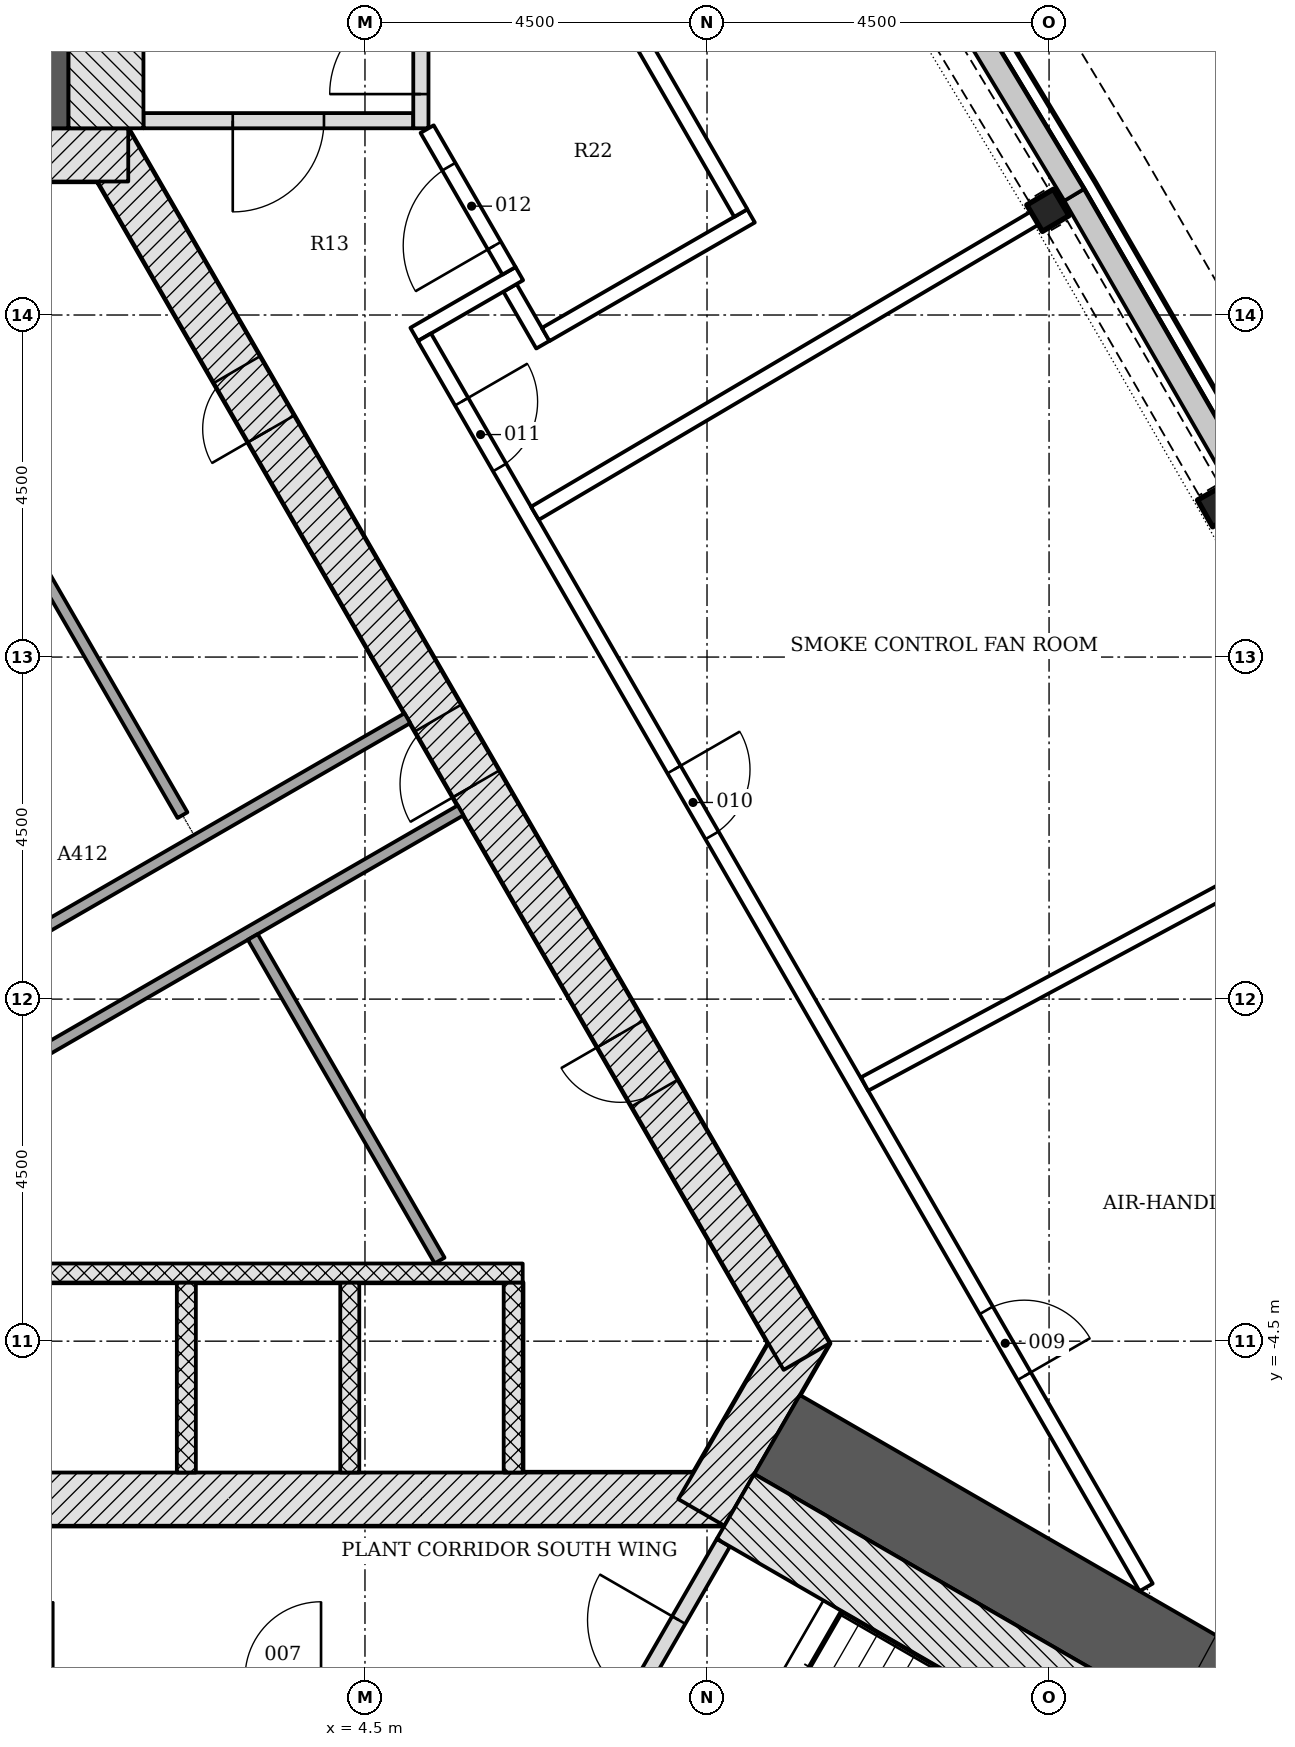
"""IFC4 building model, lengths in metres.
Left out: names, types, materials, properties, quantities, classifications, styles, units other than length and angle.
Written with IfcOpenShell. Run it as: python <this file> out.ifc"""

import sys

from ifc_helpers import new_model, si_unit, direction, frame, frame_2d, origin, origin_2d, place, context, subcontext, project, spatial, polyline, rectangle, i_section, outline, extrude, element, fill, save


model = new_model("IFC4")
c1 = context("Model", 3, precision=1e-05, world=origin(), true_north=direction((0.0, 1.0)))
c2 = subcontext(c1, "Body", "Model", "MODEL_VIEW")
j1 = project(units=[si_unit("LENGTHUNIT", "METRE"), si_unit("PLANEANGLEUNIT", "RADIAN")], contexts=[c1])
p1 = place(None, origin())
s1 = spatial("IfcSite", under=j1, at=p1, CompositionType="ELEMENT")
p2 = place(p1, origin())
s2 = spatial("IfcBuilding", under=s1, at=p2, CompositionType="ELEMENT")
p3 = place(p2, frame((0.0, 0.0, 87.0)))
s3 = spatial("IfcBuildingStorey", under=s2, at=p3, CompositionType="ELEMENT", Elevation=87.0)
p4 = place(p3, frame((-9.229, -6.578, -0.3), z_axis=(0.0, 0.0, 1.0), x_axis=(1.0, 0.0, 0.0)))
e1 = element("IfcWall", 1, at=p4, inside=s3, PredefinedType="SHEAR", context=c2, shape_type="SweptSolid", body=[
    extrude(rectangle(XDim=18.458, YDim=0.7, at=frame_2d((9.229, 0.0))), origin(), (0.0, 0.0, 1.0), 4.6),
])
p5 = place(p4, frame((1.079, 0.0, 0.3)))
e2 = element("IfcOpeningElement", 2, at=p5, cuts=e1, PredefinedType="OPENING", context=c2, shape_type="SweptSolid", body=[
    extrude(rectangle(XDim=0.9, YDim=2.1, at=frame_2d((0.45, 1.05))), frame((0.0, 0.36, 0.0), z_axis=(0.0, -1.0, 0.0), x_axis=(1.0, 0.0, 0.0)), (0.0, 0.0, 1.0), 0.72),
])
p6 = place(p3, frame((8.926, -6.753, -0.3), z_axis=(0.0, 0.0, 1.0), x_axis=(0.500042739161, 0.866000726912, 0.0)))
e3 = element("IfcWall", 3, at=p6, inside=s3, PredefinedType="SHEAR", context=c2, shape_type="SweptSolid", body=[
    extrude(rectangle(XDim=2.771, YDim=0.7, at=frame_2d((1.386, 0.0))), origin(), (0.0, 0.0, 1.0), 4.6),
])
p7 = place(p3, frame((10.311, -4.703, -0.3), z_axis=(0.0, 0.0, 1.0), x_axis=(-0.500001446645, 0.866024568562, 0.0)))
e4 = element("IfcWall", 4, at=p7, inside=s3, PredefinedType="SHEAR", context=c2, shape_type="SweptSolid", body=[
    extrude(rectangle(XDim=18.458, YDim=0.7, at=frame_2d((9.229, 0.0))), origin(), (0.0, 0.0, 1.0), 4.6),
])
p8 = place(p7, frame((8.7, 0.0, 0.3)))
e5 = element("IfcOpeningElement", 5, at=p8, cuts=e4, PredefinedType="OPENING", context=c2, shape_type="SweptSolid", body=[
    extrude(rectangle(XDim=1.0, YDim=2.1, at=frame_2d((0.5, 1.05))), frame((0.0, 0.36, 0.0), z_axis=(0.0, -1.0, 0.0), x_axis=(1.0, 0.0, 0.0)), (0.0, 0.0, 1.0), 0.72),
])
p9 = place(p7, frame((4.002, 0.0, 0.3)))
e6 = element("IfcOpeningElement", 6, at=p9, cuts=e4, PredefinedType="OPENING", context=c2, shape_type="SweptSolid", body=[
    extrude(rectangle(XDim=0.9, YDim=2.1, at=frame_2d((0.45, 1.05))), frame((0.0, 0.36, 0.0), z_axis=(0.0, -1.0, 0.0), x_axis=(1.0, 0.0, 0.0)), (0.0, 0.0, 1.0), 0.72),
])
p10 = place(p7, frame((14.093, 0.0, 0.3)))
e7 = element("IfcOpeningElement", 7, at=p10, cuts=e4, PredefinedType="OPENING", context=c2, shape_type="SweptSolid", body=[
    extrude(rectangle(XDim=0.9, YDim=2.1, at=frame_2d((0.45, 1.05))), frame((0.0, 0.36, 0.0), z_axis=(0.0, -1.0, 0.0), x_axis=(1.0, 0.0, 0.0)), (0.0, 0.0, 1.0), 0.72),
])
p11 = place(p3, frame((1.386, 11.106, -0.3), z_axis=(0.0, 0.0, 1.0), x_axis=(-1.0, 0.0, 0.0)))
e8 = element("IfcWall", 8, at=p11, inside=s3, PredefinedType="SHEAR", context=c2, shape_type="SweptSolid", body=[
    extrude(rectangle(XDim=2.771, YDim=0.7, at=frame_2d((1.386, 0.0))), origin(), (0.0, 0.0, 1.0), 4.6),
])
p12 = place(p3, frame((0.0, 11.456, -0.3), z_axis=(0.0, 0.0, 1.0), x_axis=(0.0, 1.0, 0.0)))
e9 = element("IfcWall", 9, at=p12, inside=s3, PredefinedType="SHEAR", context=c2, shape_type="SweptSolid", body=[
    extrude(rectangle(XDim=12.678, YDim=1.2, at=frame_2d((6.339, 0.0))), origin(), (0.0, 0.0, 1.0), 4.6),
])
p13 = place(p3, frame((9.922, -5.728, -0.3), z_axis=(0.0, 0.0, 1.0), x_axis=(0.866029086277, -0.499993621681, 0.0)))
e10 = element("IfcWall", 10, at=p13, inside=s3, PredefinedType="SHEAR", context=c2, shape_type="SweptSolid", body=[
    extrude(rectangle(XDim=12.677, YDim=1.2, at=frame_2d((6.339, 0.0))), origin(), (0.0, 0.0, 1.0), 4.6),
])
for number, where, z_axis, x_axis in (
    (11, (15.729, 6.49, -0.3), (0.0, 0.0, 1.0), (-0.491, 0.871, 0.0)),
    (12, (13.484, 10.377, -0.3), (0.0, 0.0, 1.0), (-0.508, 0.861, 0.0)),
):
    element("IfcColumn", number, at=place(p3, frame(where, z_axis=z_axis, x_axis=x_axis)), inside=s3, PredefinedType="COLUMN", context=c2, shape_type="SweptSolid", body=[
        extrude(i_section(OverallWidth=0.404, OverallDepth=0.406, WebThickness=0.027, FlangeThickness=0.044, FilletRadius=0.015, at=origin_2d()), origin(), (0.0, 0.0, 1.0), 4.6),
    ])
p14 = place(p3, origin())
e13 = element("IfcWall", 13, at=p14, inside=s3, PredefinedType="NOTDEFINED", context=c2, shape_type="SweptSolid", body=[
    extrude(outline(polyline([(16.208, 6.76), (13.958, 10.657), (13.698, 10.507), (15.948, 6.61), (16.208, 6.76)])), origin(), (0.0, 0.0, 1.0), 1.2),
])
p15 = place(p3, origin())
e14 = element("IfcWall", 14, at=p15, inside=s3, PredefinedType="NOTDEFINED", context=c2, shape_type="SweptSolid", body=[
    extrude(outline(polyline([(13.958, 10.657), (11.632, 14.509), (11.375, 14.354), (13.701, 10.502), (13.958, 10.657)])), origin(), (0.0, 0.0, 1.0), 1.2),
])
for number, where, z_axis, x_axis in (
    (15, (2.15, -6.228, -0.3), (0.0, 0.0, 1.0), (0.0, 1.0, 0.0)),
    (16, (4.3, -6.228, -0.3), (0.0, 0.0, 1.0), (0.0, 1.0, 0.0)),
    (17, (6.45, -6.228, -0.3), (0.0, 0.0, 1.0), (0.0, 1.0, 0.0)),
):
    element("IfcWall", number, at=place(p3, frame(where, z_axis=z_axis, x_axis=x_axis)), inside=s3, PredefinedType="PARTITIONING", context=c2, shape_type="SweptSolid", body=[
        extrude(rectangle(XDim=2.5, YDim=0.25, at=frame_2d((1.25, 0.0))), origin(), (0.0, 0.0, 1.0), 4.6),
    ])
p16 = place(p3, frame((-6.575, -3.603, 0.0), z_axis=(0.0, 0.0, 1.0), x_axis=(1.0, 0.0, 0.0)))
e18 = element("IfcWall", 18, at=p16, inside=s3, PredefinedType="PARTITIONING", context=c2, shape_type="SweptSolid", body=[
    extrude(rectangle(XDim=13.15, YDim=0.25, at=frame_2d((6.575, 0.0))), origin(), (0.0, 0.0, 1.0), 4.3),
])
p17 = place(p3, frame((-4.548, -1.851, 0.0), z_axis=(0.0, 0.0, 1.0), x_axis=(0.866023939251, 0.500002536638, 0.0)))
e19 = element("IfcWall", 19, at=p17, inside=s3, PredefinedType="PARTITIONING", context=c2, shape_type="SweptSolid", body=[
    extrude(rectangle(XDim=11.092, YDim=0.15, at=frame_2d((5.546, 0.0))), origin(), (0.0, 0.0, 1.0), 4.3),
])
p18 = place(p17, frame((3.497, 0.0, 0.0)))
e20 = element("IfcOpeningElement", 20, at=p18, cuts=e19, PredefinedType="OPENING", context=c2, shape_type="SweptSolid", body=[
    extrude(rectangle(XDim=0.9, YDim=2.1, at=frame_2d((0.45, 1.05))), frame((0.0, 0.085, 0.0), z_axis=(0.0, -1.0, 0.0), x_axis=(1.0, 0.0, 0.0)), (0.0, 0.0, 1.0), 0.17),
])
p19 = place(p3, frame((2.099, 2.42, 0.0), z_axis=(0.0, 0.0, 1.0), x_axis=(-0.499998449073, 0.866026299211, 0.0)))
e21 = element("IfcWall", 21, at=p19, inside=s3, PredefinedType="PARTITIONING", context=c2, shape_type="SweptSolid", body=[
    extrude(rectangle(XDim=4.211, YDim=0.15, at=frame_2d((2.106, 0.0))), origin(), (0.0, 0.0, 1.0), 4.3),
])
p20 = place(p3, frame((-4.454, -3.413, 0.0), z_axis=(0.0, 0.0, 1.0), x_axis=(0.86603043987, 0.499991277142, 0.0)))
e22 = element("IfcWall", 22, at=p20, inside=s3, PredefinedType="PARTITIONING", context=c2, shape_type="SweptSolid", body=[
    extrude(rectangle(XDim=11.792, YDim=0.15, at=frame_2d((5.896, 0.0))), origin(), (0.0, 0.0, 1.0), 4.3),
])
p21 = place(p20, frame((3.847, 0.0, 0.0)))
e23 = element("IfcOpeningElement", 23, at=p21, cuts=e22, PredefinedType="OPENING", context=c2, shape_type="SweptSolid", body=[
    extrude(rectangle(XDim=0.9, YDim=2.1, at=frame_2d((0.45, 1.05))), frame((0.0, 0.085, 0.0), z_axis=(0.0, -1.0, 0.0), x_axis=(1.0, 0.0, 0.0)), (0.0, 0.0, 1.0), 0.17),
])
p22 = place(p3, frame((5.482, -3.439, 0.0), z_axis=(0.0, 0.0, 1.0), x_axis=(-0.500006183238, 0.866021833861, 0.0)))
e24 = element("IfcWall", 24, at=p22, inside=s3, PredefinedType="PARTITIONING", context=c2, shape_type="SweptSolid", body=[
    extrude(rectangle(XDim=4.916, YDim=0.15, at=frame_2d((2.458, 0.0))), origin(), (0.0, 0.0, 1.0), 4.3),
])
p23 = place(p3, frame((5.135, 11.556, -0.3), z_axis=(0.0, 0.0, 1.0), x_axis=(-1.0, 0.0, 0.0)))
e25 = element("IfcWall", 25, at=p23, inside=s3, PredefinedType="SHEAR", context=c2, shape_type="SweptSolid", body=[
    extrude(rectangle(XDim=3.55, YDim=0.2, at=frame_2d((1.775, 0.0))), origin(), (0.0, 0.0, 1.0), 4.6),
])
p24 = place(p23, frame((1.175, 0.0, 0.3)))
e26 = element("IfcOpeningElement", 26, at=p24, cuts=e25, PredefinedType="OPENING", context=c2, shape_type="SweptSolid", body=[
    extrude(rectangle(XDim=1.2, YDim=2.1, at=frame_2d((0.6, 1.05))), frame((0.0, 0.11, 0.0), z_axis=(0.0, -1.0, 0.0), x_axis=(1.0, 0.0, 0.0)), (0.0, 0.0, 1.0), 0.22),
])
p25 = place(p3, frame((5.236, 11.456, -0.3), z_axis=(0.0, 0.0, 1.0), x_axis=(0.0, 1.0, 0.0)))
e27 = element("IfcWall", 27, at=p25, inside=s3, PredefinedType="SHEAR", context=c2, shape_type="SweptSolid", body=[
    extrude(rectangle(XDim=5.6, YDim=0.2, at=frame_2d((2.8, 0.0))), origin(), (0.0, 0.0, 1.0), 4.6),
])
p26 = place(p25, frame((0.45, 0.0, 0.3)))
e28 = element("IfcOpeningElement", 28, at=p26, cuts=e27, PredefinedType="OPENING", context=c2, shape_type="SweptSolid", body=[
    extrude(rectangle(XDim=1.2, YDim=2.1, at=frame_2d((0.6, 1.05))), frame((0.0, 0.11, 0.0), z_axis=(0.0, -1.0, 0.0), x_axis=(1.0, 0.0, 0.0)), (0.0, 0.0, 1.0), 0.22),
])
p27 = place(p3, frame((1.093, 11.456, -0.3), z_axis=(0.0, 0.0, 1.0), x_axis=(0.0, 1.0, 0.0)))
e29 = element("IfcWall", 29, at=p27, inside=s3, PredefinedType="SHEAR", context=c2, shape_type="SweptSolid", body=[
    extrude(rectangle(XDim=7.2, YDim=0.986, at=frame_2d((3.6, 0.0))), origin(), (0.0, 0.0, 1.0), 4.6),
])
p28 = place(p3, frame((7.44, -10.226, -0.3), z_axis=(0.0, 0.0, 1.0), x_axis=(0.500022077904, 0.866012656725, 0.0)))
e30 = element("IfcWall", 30, at=p28, inside=s3, PredefinedType="SHEAR", context=c2, shape_type="SweptSolid", body=[
    extrude(rectangle(XDim=3.55, YDim=0.2, at=frame_2d((1.775, 0.0))), origin(), (0.0, 0.0, 1.0), 4.6),
])
p29 = place(p28, frame((1.175, 0.0, 0.3)))
e31 = element("IfcOpeningElement", 31, at=p29, cuts=e30, PredefinedType="OPENING", context=c2, shape_type="SweptSolid", body=[
    extrude(rectangle(XDim=1.2, YDim=2.1, at=frame_2d((0.6, 1.05))), frame((0.0, 0.11, 0.0), z_axis=(0.0, -1.0, 0.0), x_axis=(1.0, 0.0, 0.0)), (0.0, 0.0, 1.0), 0.22),
])
p30 = place(p3, frame((9.375, -6.675, -0.3), z_axis=(0.0, 0.0, 1.0), x_axis=(0.866026919366, -0.499997374926, 0.0)))
e32 = element("IfcWall", 32, at=p30, inside=s3, PredefinedType="SHEAR", context=c2, shape_type="SweptSolid", body=[
    extrude(rectangle(XDim=7.2, YDim=0.986, at=frame_2d((3.6, 0.0))), origin(), (0.0, 0.0, 1.0), 4.6),
])
p31 = place(p3, frame((6.408, 9.358, 0.0), z_axis=(0.0, 0.0, 1.0), x_axis=(0.49996696679, -0.866044474677, 0.0)))
e33 = element("IfcWall", 33, at=p31, inside=s3, PredefinedType="PARTITIONING", context=c2, shape_type="SweptSolid", body=[
    extrude(rectangle(XDim=0.864, YDim=0.2, at=frame_2d((0.432, 0.0))), origin(), (0.0, 0.0, 1.0), 4.3),
])
p32 = place(p3, frame((5.147, 8.745, 0.0), z_axis=(0.0, 0.0, 1.0), x_axis=(0.865987117328, 0.500066308224, 0.0)))
e34 = element("IfcWall", 34, at=p32, inside=s3, PredefinedType="PARTITIONING", context=c2, shape_type="SweptSolid", body=[
    extrude(rectangle(XDim=1.598, YDim=0.2, at=frame_2d((0.799, 0.0))), origin(), (0.0, 0.0, 1.0), 4.3),
])
p33 = place(p3, frame((6.395, 9.581, 0.0), z_axis=(0.0, 0.0, 1.0), x_axis=(-0.500003735859, 0.866023246874, 0.0)))
e35 = element("IfcWall", 35, at=p33, inside=s3, PredefinedType="PARTITIONING", context=c2, shape_type="SweptSolid", body=[
    extrude(rectangle(XDim=2.154, YDim=0.2, at=frame_2d((1.077, 0.0))), origin(), (0.0, 0.0, 1.0), 3.678),
])
p34 = place(p33, frame((0.383, 0.0, 0.0)))
e36 = element("IfcOpeningElement", 36, at=p34, cuts=e35, PredefinedType="OPENING", context=c2, shape_type="SweptSolid", body=[
    extrude(rectangle(XDim=1.2, YDim=2.1, at=frame_2d((0.6, 1.05))), frame((0.0, 0.11, 0.0), z_axis=(0.0, -1.0, 0.0), x_axis=(1.0, 0.0, 0.0)), (0.0, 0.0, 1.0), 0.22),
])
p35 = place(p3, frame((5.282, 8.708, 0.0), z_axis=(0.0, 0.0, 1.0), x_axis=(0.500007704848, -0.866020955343, 0.0)))
e37 = element("IfcWall", 37, at=p35, inside=s3, PredefinedType="PARTITIONING", context=c2, shape_type="SweptSolid", body=[
    extrude(rectangle(XDim=18.991, YDim=0.2, at=frame_2d((9.496, 0.0))), origin(), (0.0, 0.0, 1.0), 3.678),
])
p36 = place(p35, frame((14.783, 0.0, 0.0)))
e38 = element("IfcOpeningElement", 38, at=p36, cuts=e37, PredefinedType="OPENING", context=c2, shape_type="SweptSolid", body=[
    extrude(rectangle(XDim=1.0, YDim=2.1, at=frame_2d((0.5, 1.05))), frame((0.0, 0.11, 0.0), z_axis=(0.0, -1.0, 0.0), x_axis=(1.0, 0.0, 0.0)), (0.0, 0.0, 1.0), 0.22),
])
p37 = place(p35, frame((6.567, 0.0, 0.0)))
e39 = element("IfcOpeningElement", 39, at=p37, cuts=e37, PredefinedType="OPENING", context=c2, shape_type="SweptSolid", body=[
    extrude(rectangle(XDim=1.0, YDim=2.1, at=frame_2d((0.5, 1.05))), frame((0.0, 0.11, 0.0), z_axis=(0.0, -1.0, 0.0), x_axis=(1.0, 0.0, 0.0)), (0.0, 0.0, 1.0), 0.22),
])
p38 = place(p35, frame((0.979, 0.0, 0.0)))
e40 = element("IfcOpeningElement", 40, at=p38, cuts=e37, PredefinedType="OPENING", context=c2, shape_type="SweptSolid", body=[
    extrude(rectangle(XDim=1.0, YDim=2.1, at=frame_2d((0.5, 1.05))), frame((0.0, 0.11, 0.0), z_axis=(0.0, -1.0, 0.0), x_axis=(1.0, 0.0, 0.0)), (0.0, 0.0, 1.0), 0.22),
])
p39 = place(p3, frame((11.073, -1.117, 0.0), z_axis=(0.0, 0.0, 1.0), x_axis=(0.880412298069, 0.474209010256, 0.0)))
e41 = element("IfcWall", 41, at=p39, inside=s3, PredefinedType="PARTITIONING", context=c2, shape_type="SweptSolid", body=[
    extrude(rectangle(XDim=7.6, YDim=0.2, at=frame_2d((3.8, 0.0))), origin(), (0.0, 0.0, 1.0), 3.678),
])
p40 = place(p3, frame((6.736, 6.392, 0.0), z_axis=(0.0, 0.0, 1.0), x_axis=(0.861056110095, 0.508509955919, 0.0)))
e42 = element("IfcWall", 42, at=p40, inside=s3, PredefinedType="PARTITIONING", context=c2, shape_type="SweptSolid", body=[
    extrude(rectangle(XDim=7.688, YDim=0.2, at=frame_2d((3.844, 0.0))), origin(), (0.0, 0.0, 1.0), 3.678),
])
p41 = place(p3, frame((6.878, 8.744, 0.0), z_axis=(0.0, 0.0, 1.0), x_axis=(0.866023983177, 0.500002460556, 0.0)))
e43 = element("IfcWall", 43, at=p41, inside=s3, PredefinedType="PARTITIONING", context=c2, shape_type="SweptSolid", body=[
    extrude(rectangle(XDim=3.12, YDim=0.2, at=frame_2d((1.56, 0.0))), origin(), (0.0, 0.0, 1.0), 4.3),
])
p42 = place(p3, frame((6.566, 15.327, 0.0), z_axis=(0.0, 0.0, 1.0), x_axis=(0.499997778408, -0.866026686418, 0.0)))
e44 = element("IfcWall", 44, at=p42, inside=s3, PredefinedType="PARTITIONING", context=c2, shape_type="SweptSolid", body=[
    extrude(rectangle(XDim=5.757, YDim=0.2, at=frame_2d((2.878, 0.0))), origin(), (0.0, 0.0, 1.0), 3.678),
])
p43 = place(p8, origin())
e45 = element("IfcDoor", 45, at=p43, inside=s3, OperationType="SINGLE_SWING_LEFT", PredefinedType="DOOR", context=c2, shape_type="SweptSolid", body=[
    extrude(rectangle(XDim=1.0, YDim=2.1, at=frame_2d((0.5, 1.05))), frame((0.0, 0.075, 0.0), z_axis=(0.0, -1.0, 0.0), x_axis=(1.0, 0.0, 0.0)), (0.0, 0.0, 1.0), 0.15),
])
fill(e5, e45)
p44 = place(p9, origin())
e46 = element("IfcDoor", 46, at=p44, inside=s3, OperationType="SINGLE_SWING_RIGHT", PredefinedType="DOOR", context=c2, shape_type="SweptSolid", body=[
    extrude(rectangle(XDim=0.9, YDim=2.1, at=frame_2d((0.45, 1.05))), frame((0.0, 0.075, 0.0), z_axis=(0.0, -1.0, 0.0), x_axis=(1.0, 0.0, 0.0)), (0.0, 0.0, 1.0), 0.15),
])
fill(e6, e46)
p45 = place(p10, origin())
e47 = element("IfcDoor", 47, at=p45, inside=s3, OperationType="SINGLE_SWING_LEFT", PredefinedType="DOOR", context=c2, shape_type="SweptSolid", body=[
    extrude(rectangle(XDim=0.9, YDim=2.1, at=frame_2d((0.45, 1.05))), frame((0.0, 0.075, 0.0), z_axis=(0.0, -1.0, 0.0), x_axis=(1.0, 0.0, 0.0)), (0.0, 0.0, 1.0), 0.15),
])
fill(e7, e47)
p46 = place(p24, origin())
e48 = element("IfcDoor", 48, at=p46, inside=s3, OperationType="SINGLE_SWING_RIGHT", PredefinedType="DOOR", context=c2, shape_type="SweptSolid", body=[
    extrude(rectangle(XDim=1.2, YDim=2.1, at=frame_2d((0.6, 1.05))), frame((0.0, 0.025, 0.0), z_axis=(0.0, -1.0, 0.0), x_axis=(1.0, 0.0, 0.0)), (0.0, 0.0, 1.0), 0.05),
])
fill(e26, e48)
p47 = place(p26, origin())
e49 = element("IfcDoor", 49, at=p47, inside=s3, OperationType="SINGLE_SWING_LEFT", PredefinedType="DOOR", context=c2, shape_type="SweptSolid", body=[
    extrude(rectangle(XDim=1.2, YDim=2.1, at=frame_2d((0.6, 1.05))), frame((0.0, 0.025, 0.0), z_axis=(0.0, -1.0, 0.0), x_axis=(1.0, 0.0, 0.0)), (0.0, 0.0, 1.0), 0.05),
])
fill(e28, e49)
p48 = place(p29, origin())
e50 = element("IfcDoor", 50, at=p48, inside=s3, OperationType="SINGLE_SWING_RIGHT", PredefinedType="DOOR", context=c2, shape_type="SweptSolid", body=[
    extrude(rectangle(XDim=1.2, YDim=2.1, at=frame_2d((0.6, 1.05))), frame((0.0, 0.025, 0.0), z_axis=(0.0, -1.0, 0.0), x_axis=(1.0, 0.0, 0.0)), (0.0, 0.0, 1.0), 0.05),
])
fill(e31, e50)
p49 = place(p36, origin())
e51 = element("IfcDoor", 51, at=p49, inside=s3, OperationType="SINGLE_SWING_RIGHT", PredefinedType="DOOR", context=c2, shape_type="SweptSolid", body=[
    extrude(rectangle(XDim=1.0, YDim=2.1, at=frame_2d((0.5, 1.05))), frame((0.0, 0.025, 0.0), z_axis=(0.0, -1.0, 0.0), x_axis=(1.0, 0.0, 0.0)), (0.0, 0.0, 1.0), 0.05),
])
fill(e38, e51)
p50 = place(p37, origin())
e52 = element("IfcDoor", 52, at=p50, inside=s3, OperationType="SINGLE_SWING_LEFT", PredefinedType="DOOR", context=c2, shape_type="SweptSolid", body=[
    extrude(rectangle(XDim=1.0, YDim=2.1, at=frame_2d((0.5, 1.05))), frame((0.0, 0.025, 0.0), z_axis=(0.0, -1.0, 0.0), x_axis=(1.0, 0.0, 0.0)), (0.0, 0.0, 1.0), 0.05),
])
fill(e39, e52)
p51 = place(p38, origin())
e53 = element("IfcDoor", 53, at=p51, inside=s3, OperationType="SINGLE_SWING_LEFT", PredefinedType="DOOR", context=c2, shape_type="SweptSolid", body=[
    extrude(rectangle(XDim=1.0, YDim=2.1, at=frame_2d((0.5, 1.05))), frame((0.0, 0.025, 0.0), z_axis=(0.0, -1.0, 0.0), x_axis=(1.0, 0.0, 0.0)), (0.0, 0.0, 1.0), 0.05),
])
fill(e40, e53)
p52 = place(p34, origin())
e54 = element("IfcDoor", 54, at=p52, inside=s3, OperationType="SINGLE_SWING_LEFT", PredefinedType="DOOR", context=c2, shape_type="SweptSolid", body=[
    extrude(rectangle(XDim=1.2, YDim=2.1, at=frame_2d((0.6, 1.05))), frame((0.0, 0.025, 0.0), z_axis=(0.0, -1.0, 0.0), x_axis=(1.0, 0.0, 0.0)), (0.0, 0.0, 1.0), 0.05),
])
fill(e36, e54)
save(model, sys.argv[1])
